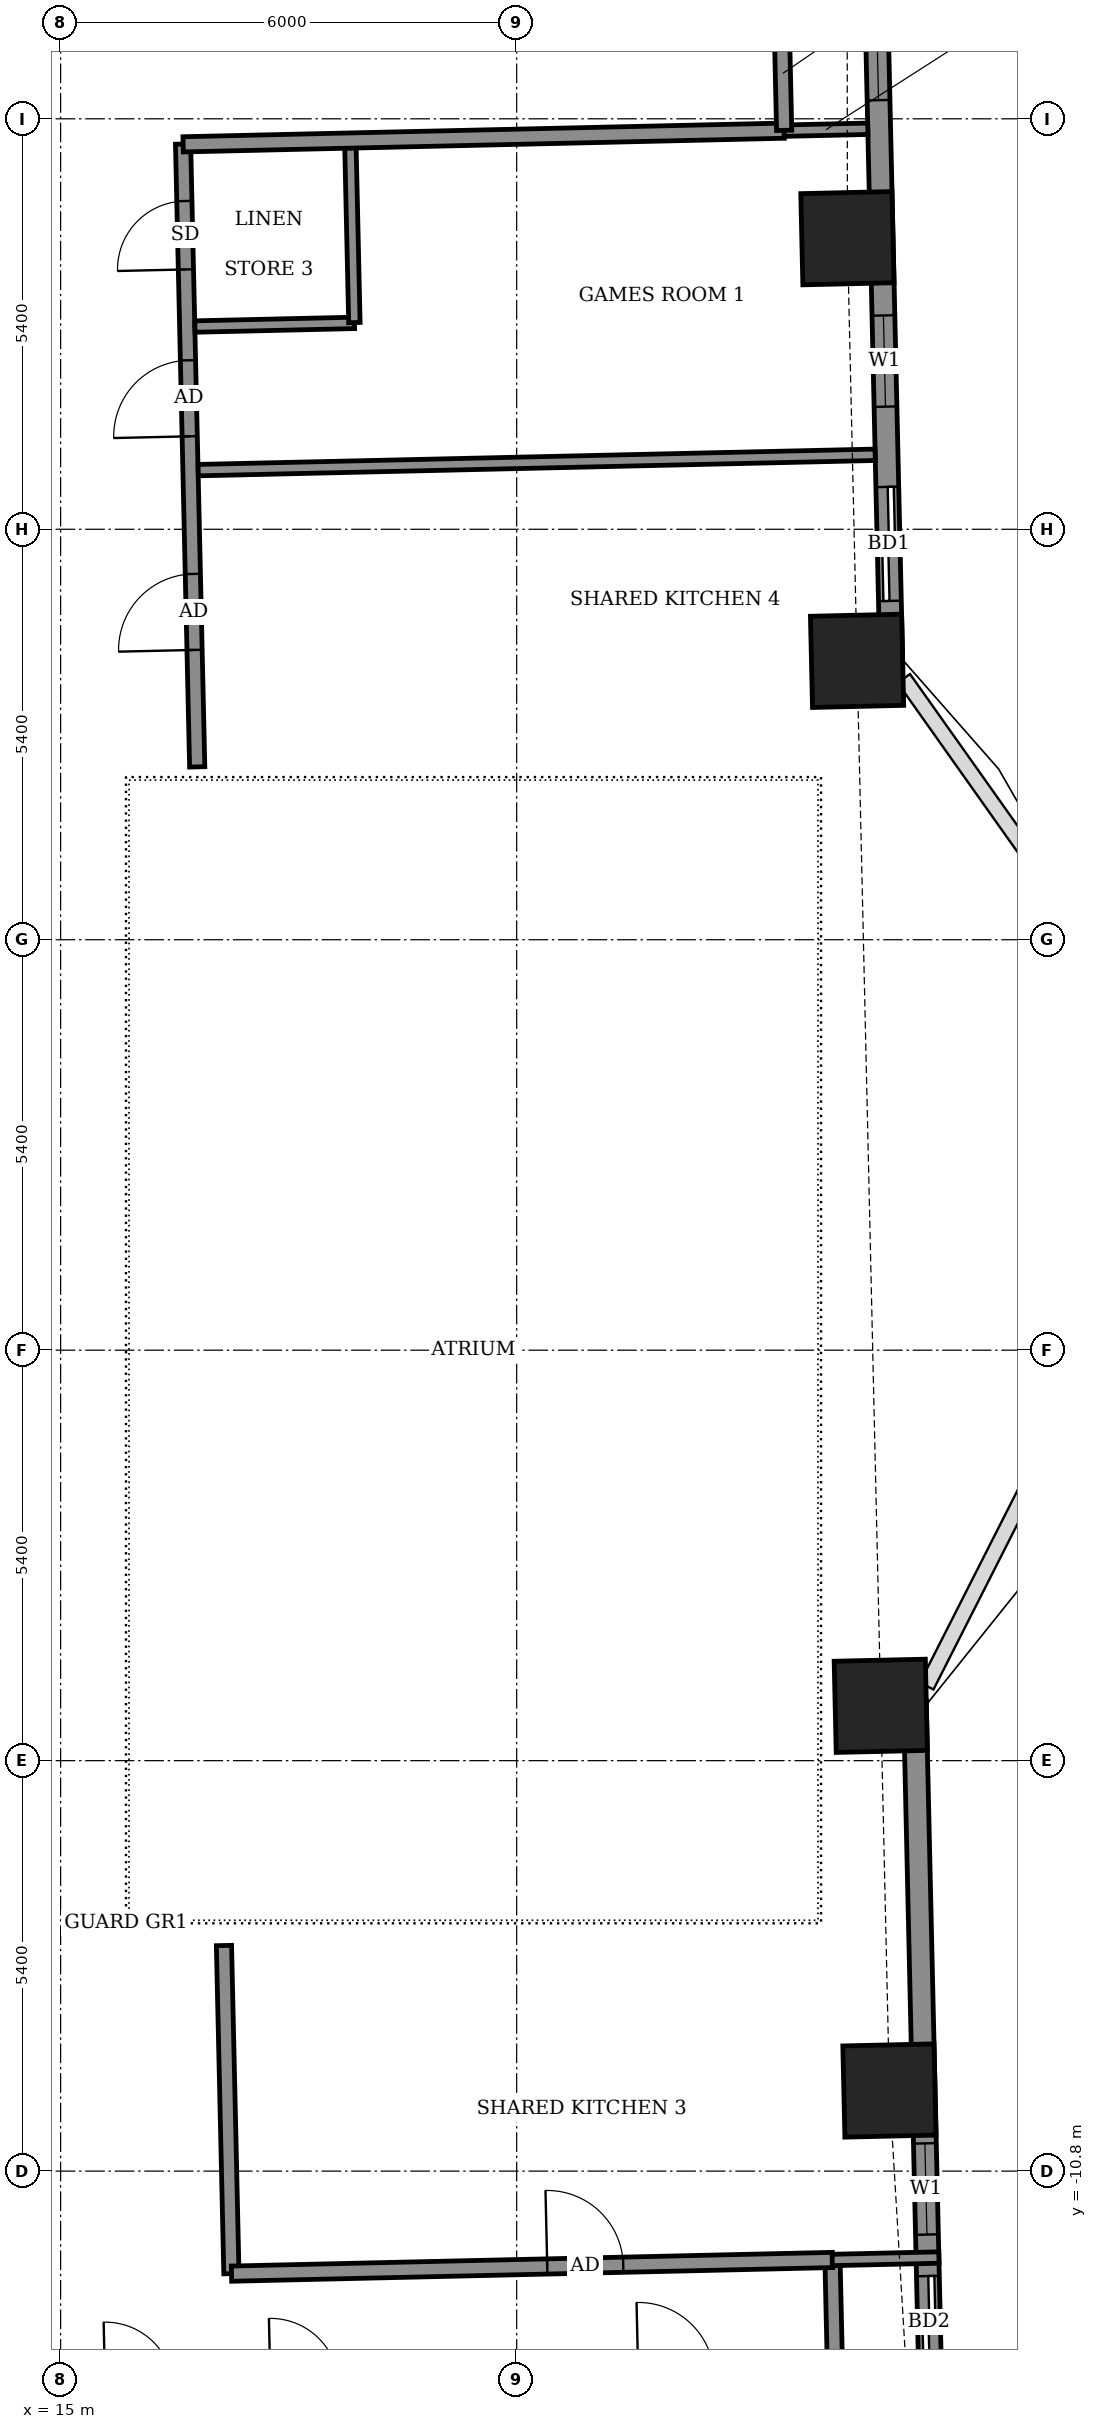
"""IFC4 building model, lengths in metres.
Left out: names, types, materials, properties, quantities, classifications, styles, units other than length and angle.
Written with IfcOpenShell. Run it as: python <this file> out.ifc"""

import sys

from ifc_helpers import new_model, si_unit, direction, frame, frame_2d, origin, origin_2d, place, context, subcontext, project, spatial, rectangle, extrude, element, fill, save


model = new_model("IFC4")
c1 = context("Model", 3, precision=1e-05, world=origin(), true_north=direction((0.0, 1.0)))
c2 = subcontext(c1, "Body", "Model", "MODEL_VIEW")
j1 = project(units=[si_unit("LENGTHUNIT", "METRE"), si_unit("PLANEANGLEUNIT", "RADIAN")], contexts=[c1])
p1 = place(None, origin())
s1 = spatial("IfcSite", under=j1, at=p1, CompositionType="ELEMENT")
p2 = place(p1, origin())
s2 = spatial("IfcBuilding", under=s1, at=p2, CompositionType="ELEMENT")
p3 = place(p2, frame((0.0, 0.0, 186.1)))
s3 = spatial("IfcBuildingStorey", under=s2, at=p3, CompositionType="ELEMENT", Elevation=186.1)
for number, where, z_axis, x_axis in (
    (1, (25.904, -9.74, -0.55), (0.0, 0.0, 1.0), (-0.023, 1.0, 0.0)),
    (2, (25.79, -4.678, -0.55), (0.0, 0.0, 1.0), (-0.023, 1.0, 0.0)),
    (3, (25.478, 9.069, -0.55), (0.0, 0.0, 1.0), (-0.023, 1.0, 0.0)),
    (4, (25.351, 14.629, -0.55), (0.0, 0.0, 1.0), (-0.023, 1.0, 0.0)),
):
    element("IfcColumn", number, at=place(p3, frame(where, z_axis=z_axis, x_axis=x_axis)), inside=s3, PredefinedType="COLUMN", context=c2, shape_type="SweptSolid", body=[
        extrude(rectangle(XDim=1.2, YDim=1.2, at=origin_2d()), origin(), (0.0, 0.0, 1.0), 3.6),
    ])
p4 = place(p3, frame((26.466, -14.64, 0.0), z_axis=(0.0, 0.0, 1.0), x_axis=(-0.022735782058, 0.999741508698, 0.0)))
e5 = element("IfcWall", 5, at=p4, inside=s3, PredefinedType="SOLIDWALL", context=c2, shape_type="SweptSolid", body=[
    extrude(rectangle(XDim=10.03, YDim=0.3, at=frame_2d((5.015, 0.0))), origin(), (0.0, 0.0, 1.0), 2.55),
])
p5 = place(p4, frame((1.26, 0.0, 0.0)))
e6 = element("IfcOpeningElement", 6, at=p5, cuts=e5, PredefinedType="OPENING", context=c2, shape_type="SweptSolid", body=[
    extrude(rectangle(XDim=1.2, YDim=2.4, at=frame_2d((0.6, 1.2))), frame((0.0, 0.16, 0.0), z_axis=(0.0, -1.0, 0.0), x_axis=(1.0, 0.0, 0.0)), (0.0, 0.0, 1.0), 0.32),
])
p6 = place(p4, frame((3.006, 0.0, 0.9)))
e7 = element("IfcOpeningElement", 7, at=p6, cuts=e5, PredefinedType="OPENING", context=c2, shape_type="SweptSolid", body=[
    extrude(rectangle(XDim=1.2, YDim=1.5, at=frame_2d((0.6, 0.75))), frame((0.0, 0.16, 0.0), z_axis=(0.0, -1.0, 0.0), x_axis=(1.0, 0.0, 0.0)), (0.0, 0.0, 1.0), 0.32),
])
p7 = place(p3, frame((25.929, 9.025, 0.0), z_axis=(0.0, 0.0, 1.0), x_axis=(-0.022667601583, 0.999743056909, 0.0)))
e8 = element("IfcWall", 8, at=p7, inside=s3, PredefinedType="SOLIDWALL", context=c2, shape_type="SweptSolid", body=[
    extrude(rectangle(XDim=11.029, YDim=0.3, at=frame_2d((5.515, 0.0))), origin(), (0.0, 0.0, 1.0), 3.05),
])
p8 = place(p7, frame((0.833, 0.0, 0.0)))
e9 = element("IfcOpeningElement", 9, at=p8, cuts=e8, PredefinedType="OPENING", context=c2, shape_type="SweptSolid", body=[
    extrude(rectangle(XDim=1.5, YDim=2.4, at=frame_2d((0.75, 1.2))), frame((0.0, 0.16, 0.0), z_axis=(0.0, -1.0, 0.0), x_axis=(1.0, 0.0, 0.0)), (0.0, 0.0, 1.0), 0.32),
])
p9 = place(p7, frame((3.389, 0.0, 0.9)))
e10 = element("IfcOpeningElement", 10, at=p9, cuts=e8, PredefinedType="OPENING", context=c2, shape_type="SweptSolid", body=[
    extrude(rectangle(XDim=1.2, YDim=1.5, at=frame_2d((0.6, 0.75))), frame((0.0, 0.16, 0.0), z_axis=(0.0, -1.0, 0.0), x_axis=(1.0, 0.0, 0.0)), (0.0, 0.0, 1.0), 0.32),
])
p10 = place(p7, frame((7.422, 0.0, 0.9)))
e11 = element("IfcOpeningElement", 11, at=p10, cuts=e8, PredefinedType="OPENING", context=c2, shape_type="SweptSolid", body=[
    extrude(rectangle(XDim=2.4, YDim=1.5, at=frame_2d((1.2, 0.75))), frame((0.0, 0.16, 0.0), z_axis=(0.0, -1.0, 0.0), x_axis=(1.0, 0.0, 0.0)), (0.0, 0.0, 1.0), 0.32),
])
p11 = place(p3, frame((25.189, -13.469, 0.0), z_axis=(0.0, 0.0, 1.0), x_axis=(-0.022617910375, 0.999744182344, 0.0)))
e12 = element("IfcWall", 12, at=p11, inside=s3, PredefinedType="PARTITIONING", context=c2, shape_type="SweptSolid", body=[
    extrude(rectangle(XDim=1.5, YDim=0.2, at=frame_2d((0.75, 0.0))), origin(), (0.0, 0.0, 1.0), 3.05),
])
p12 = place(p3, frame((17.247, -12.149, 0.0), z_axis=(0.0, 0.0, 1.0), x_axis=(-0.022729111383, 0.999741660378, 0.0)))
e13 = element("IfcWall", 13, at=p12, inside=s3, PredefinedType="PARTITIONING", context=c2, shape_type="SweptSolid", body=[
    extrude(rectangle(XDim=4.318, YDim=0.2, at=frame_2d((2.159, 0.0))), origin(), (0.0, 0.0, 1.0), 3.05),
])
p13 = place(p3, frame((17.248, -12.149, 0.0), z_axis=(0.0, 0.0, 1.0), x_axis=(0.999741181744, 0.022750154412, 0.0)))
e14 = element("IfcWall", 14, at=p13, inside=s3, PredefinedType="PARTITIONING", context=c2, shape_type="SweptSolid", body=[
    extrude(rectangle(XDim=7.909, YDim=0.2, at=frame_2d((3.955, 0.0))), origin(), (0.0, 0.0, 1.0), 3.05),
])
p14 = place(p13, frame((4.155, 0.0, 0.0)))
e15 = element("IfcOpeningElement", 15, at=p14, cuts=e14, PredefinedType="OPENING", context=c2, shape_type="SweptSolid", body=[
    extrude(rectangle(XDim=1.0, YDim=2.1, at=frame_2d((0.5, 1.05))), frame((0.0, 0.11, 0.0), z_axis=(0.0, -1.0, 0.0), x_axis=(1.0, 0.0, 0.0)), (0.0, 0.0, 1.0), 0.22),
])
p15 = place(p3, frame((25.151, -11.969, 0.0), z_axis=(0.0, 0.0, 1.0), x_axis=(0.999740667531, 0.022772739949, 0.0)))
e16 = element("IfcWall", 16, at=p15, inside=s3, PredefinedType="PARTITIONING", context=c2, shape_type="SweptSolid", body=[
    extrude(rectangle(XDim=1.404, YDim=0.15, at=frame_2d((0.702, 0.0))), origin(), (0.0, 0.0, 1.0), 2.55),
])
p16 = place(p3, frame((16.797, 7.674, 0.0), z_axis=(0.0, 0.0, 1.0), x_axis=(-0.022698399288, 0.999742358145, 0.0)))
e17 = element("IfcWall", 17, at=p16, inside=s3, PredefinedType="PARTITIONING", context=c2, shape_type="SweptSolid", body=[
    extrude(rectangle(XDim=8.196, YDim=0.2, at=frame_2d((4.098, 0.0))), origin(), (0.0, 0.0, 1.0), 3.05),
])
p17 = place(p16, frame((1.539, 0.0, 0.0)))
e18 = element("IfcOpeningElement", 18, at=p17, cuts=e17, PredefinedType="OPENING", context=c2, shape_type="SweptSolid", body=[
    extrude(rectangle(XDim=1.0, YDim=2.1, at=frame_2d((0.5, 1.05))), frame((0.0, 0.11, 0.0), z_axis=(0.0, -1.0, 0.0), x_axis=(1.0, 0.0, 0.0)), (0.0, 0.0, 1.0), 0.22),
])
p18 = place(p16, frame((4.35, 0.0, 0.0)))
e19 = element("IfcOpeningElement", 19, at=p18, cuts=e17, PredefinedType="OPENING", context=c2, shape_type="SweptSolid", body=[
    extrude(rectangle(XDim=1.0, YDim=2.1, at=frame_2d((0.5, 1.05))), frame((0.0, 0.11, 0.0), z_axis=(0.0, -1.0, 0.0), x_axis=(1.0, 0.0, 0.0)), (0.0, 0.0, 1.0), 0.22),
])
p19 = place(p16, frame((6.546, 0.0, 0.0)))
e20 = element("IfcOpeningElement", 20, at=p19, cuts=e17, PredefinedType="OPENING", context=c2, shape_type="SweptSolid", body=[
    extrude(rectangle(XDim=0.9, YDim=2.1, at=frame_2d((0.45, 1.05))), frame((0.0, 0.11, 0.0), z_axis=(0.0, -1.0, 0.0), x_axis=(1.0, 0.0, 0.0)), (0.0, 0.0, 1.0), 0.22),
])
p20 = place(p3, frame((16.81, 11.578, 0.0), z_axis=(0.0, 0.0, 1.0), x_axis=(0.999742500104, 0.022692145895, 0.0)))
e21 = element("IfcWall", 21, at=p20, inside=s3, PredefinedType="PARTITIONING", context=c2, shape_type="SweptSolid", body=[
    extrude(rectangle(XDim=8.908, YDim=0.15, at=frame_2d((4.454, 0.0))), origin(), (0.0, 0.0, 1.0), 2.55),
])
p21 = place(p3, frame((16.767, 13.467, 0.0), z_axis=(0.0, 0.0, 1.0), x_axis=(0.999740212033, 0.022792727877, 0.0)))
e22 = element("IfcWall", 22, at=p21, inside=s3, PredefinedType="PARTITIONING", context=c2, shape_type="SweptSolid", body=[
    extrude(rectangle(XDim=2.099, YDim=0.15, at=frame_2d((1.05, 0.0))), origin(), (0.0, 0.0, 1.0), 3.05),
])
p22 = place(p3, frame((18.865, 13.519, 0.0), z_axis=(0.0, 0.0, 1.0), x_axis=(-0.022612884682, 0.999744296031, 0.0)))
e23 = element("IfcWall", 23, at=p22, inside=s3, PredefinedType="PARTITIONING", context=c2, shape_type="SweptSolid", body=[
    extrude(rectangle(XDim=2.3, YDim=0.15, at=frame_2d((1.15, 0.0))), origin(), (0.0, 0.0, 1.0), 3.05),
])
p23 = place(p3, frame((16.612, 15.864, 0.0), z_axis=(0.0, 0.0, 1.0), x_axis=(0.999741181744, 0.022750154412, 0.0)))
e24 = element("IfcWall", 24, at=p23, inside=s3, PredefinedType="PARTITIONING", context=c2, shape_type="SweptSolid", body=[
    extrude(rectangle(XDim=7.909, YDim=0.2, at=frame_2d((3.955, 0.0))), origin(), (0.0, 0.0, 1.0), 3.05),
])
p24 = place(p3, frame((24.519, 16.044, 0.0), z_axis=(0.0, 0.0, 1.0), x_axis=(0.999738732953, 0.022857511541, 0.0)))
e25 = element("IfcWall", 25, at=p24, inside=s3, PredefinedType="PARTITIONING", context=c2, shape_type="SweptSolid", body=[
    extrude(rectangle(XDim=1.1, YDim=0.15, at=frame_2d((0.55, 0.0))), origin(), (0.0, 0.0, 1.0), 2.55),
])
p25 = place(p3, frame((24.519, 16.048, 0.0), z_axis=(0.0, 0.0, 1.0), x_axis=(-0.022632637625, 0.99974384905, 0.0)))
e26 = element("IfcWall", 26, at=p25, inside=s3, PredefinedType="PARTITIONING", context=c2, shape_type="SweptSolid", body=[
    extrude(rectangle(XDim=1.5, YDim=0.2, at=frame_2d((0.75, 0.0))), origin(), (0.0, 0.0, 1.0), 3.05),
])
p26 = place(p5, origin())
e27 = element("IfcDoor", 27, at=p26, inside=s3, OperationType="SLIDING_TO_LEFT", PredefinedType="DOOR", context=c2, shape_type="SweptSolid", body=[
    extrude(rectangle(XDim=1.2, YDim=2.4, at=frame_2d((0.6, 1.2))), frame((0.0, 0.025, 0.0), z_axis=(0.0, -1.0, 0.0), x_axis=(1.0, 0.0, 0.0)), (0.0, 0.0, 1.0), 0.05),
])
fill(e6, e27)
p27 = place(p6, origin())
e28 = element("IfcWindow", 28, at=p27, inside=s3, PartitioningType="SINGLE_PANEL", PredefinedType="WINDOW", context=c2, shape_type="SweptSolid", body=[
    extrude(rectangle(XDim=1.2, YDim=1.5, at=frame_2d((0.6, 0.75))), frame((0.0, 0.03, 0.0), z_axis=(0.0, -1.0, 0.0), x_axis=(1.0, 0.0, 0.0)), (0.0, 0.0, 1.0), 0.06),
])
fill(e7, e28)
p28 = place(p8, origin())
e29 = element("IfcDoor", 29, at=p28, inside=s3, OperationType="SLIDING_TO_LEFT", PredefinedType="DOOR", context=c2, shape_type="SweptSolid", body=[
    extrude(rectangle(XDim=1.5, YDim=2.4, at=frame_2d((0.75, 1.2))), frame((0.0, 0.025, 0.0), z_axis=(0.0, -1.0, 0.0), x_axis=(1.0, 0.0, 0.0)), (0.0, 0.0, 1.0), 0.05),
])
fill(e9, e29)
p29 = place(p9, origin())
e30 = element("IfcWindow", 30, at=p29, inside=s3, PartitioningType="SINGLE_PANEL", PredefinedType="WINDOW", context=c2, shape_type="SweptSolid", body=[
    extrude(rectangle(XDim=1.2, YDim=1.5, at=frame_2d((0.6, 0.75))), frame((0.0, 0.03, 0.0), z_axis=(0.0, -1.0, 0.0), x_axis=(1.0, 0.0, 0.0)), (0.0, 0.0, 1.0), 0.06),
])
fill(e10, e30)
p30 = place(p10, origin())
e31 = element("IfcWindow", 31, at=p30, inside=s3, PartitioningType="DOUBLE_PANEL_VERTICAL", PredefinedType="WINDOW", context=c2, shape_type="SweptSolid", body=[
    extrude(rectangle(XDim=2.4, YDim=1.5, at=frame_2d((1.2, 0.75))), frame((0.0, 0.03, 0.0), z_axis=(0.0, -1.0, 0.0), x_axis=(1.0, 0.0, 0.0)), (0.0, 0.0, 1.0), 0.06),
])
fill(e11, e31)
p31 = place(p14, origin())
e32 = element("IfcDoor", 32, at=p31, inside=s3, OperationType="SINGLE_SWING_LEFT", PredefinedType="DOOR", context=c2, shape_type="SweptSolid", body=[
    extrude(rectangle(XDim=1.0, YDim=2.1, at=frame_2d((0.5, 1.05))), frame((0.0, 0.025, 0.0), z_axis=(0.0, -1.0, 0.0), x_axis=(1.0, 0.0, 0.0)), (0.0, 0.0, 1.0), 0.05),
])
fill(e15, e32)
p32 = place(p17, origin())
e33 = element("IfcDoor", 33, at=p32, inside=s3, OperationType="SINGLE_SWING_RIGHT", PredefinedType="DOOR", context=c2, shape_type="SweptSolid", body=[
    extrude(rectangle(XDim=1.0, YDim=2.1, at=frame_2d((0.5, 1.05))), frame((0.0, 0.025, 0.0), z_axis=(0.0, -1.0, 0.0), x_axis=(1.0, 0.0, 0.0)), (0.0, 0.0, 1.0), 0.05),
])
fill(e18, e33)
p33 = place(p18, origin())
e34 = element("IfcDoor", 34, at=p33, inside=s3, OperationType="SINGLE_SWING_LEFT", PredefinedType="DOOR", context=c2, shape_type="SweptSolid", body=[
    extrude(rectangle(XDim=1.0, YDim=2.1, at=frame_2d((0.5, 1.05))), frame((0.0, 0.025, 0.0), z_axis=(0.0, -1.0, 0.0), x_axis=(1.0, 0.0, 0.0)), (0.0, 0.0, 1.0), 0.05),
])
fill(e19, e34)
p34 = place(p19, origin())
e35 = element("IfcDoor", 35, at=p34, inside=s3, OperationType="SINGLE_SWING_LEFT", PredefinedType="DOOR", context=c2, shape_type="SweptSolid", body=[
    extrude(rectangle(XDim=0.9, YDim=2.1, at=frame_2d((0.45, 1.05))), frame((0.0, 0.025, 0.0), z_axis=(0.0, -1.0, 0.0), x_axis=(1.0, 0.0, 0.0)), (0.0, 0.0, 1.0), 0.05),
])
fill(e20, e35)
save(model, sys.argv[1])
